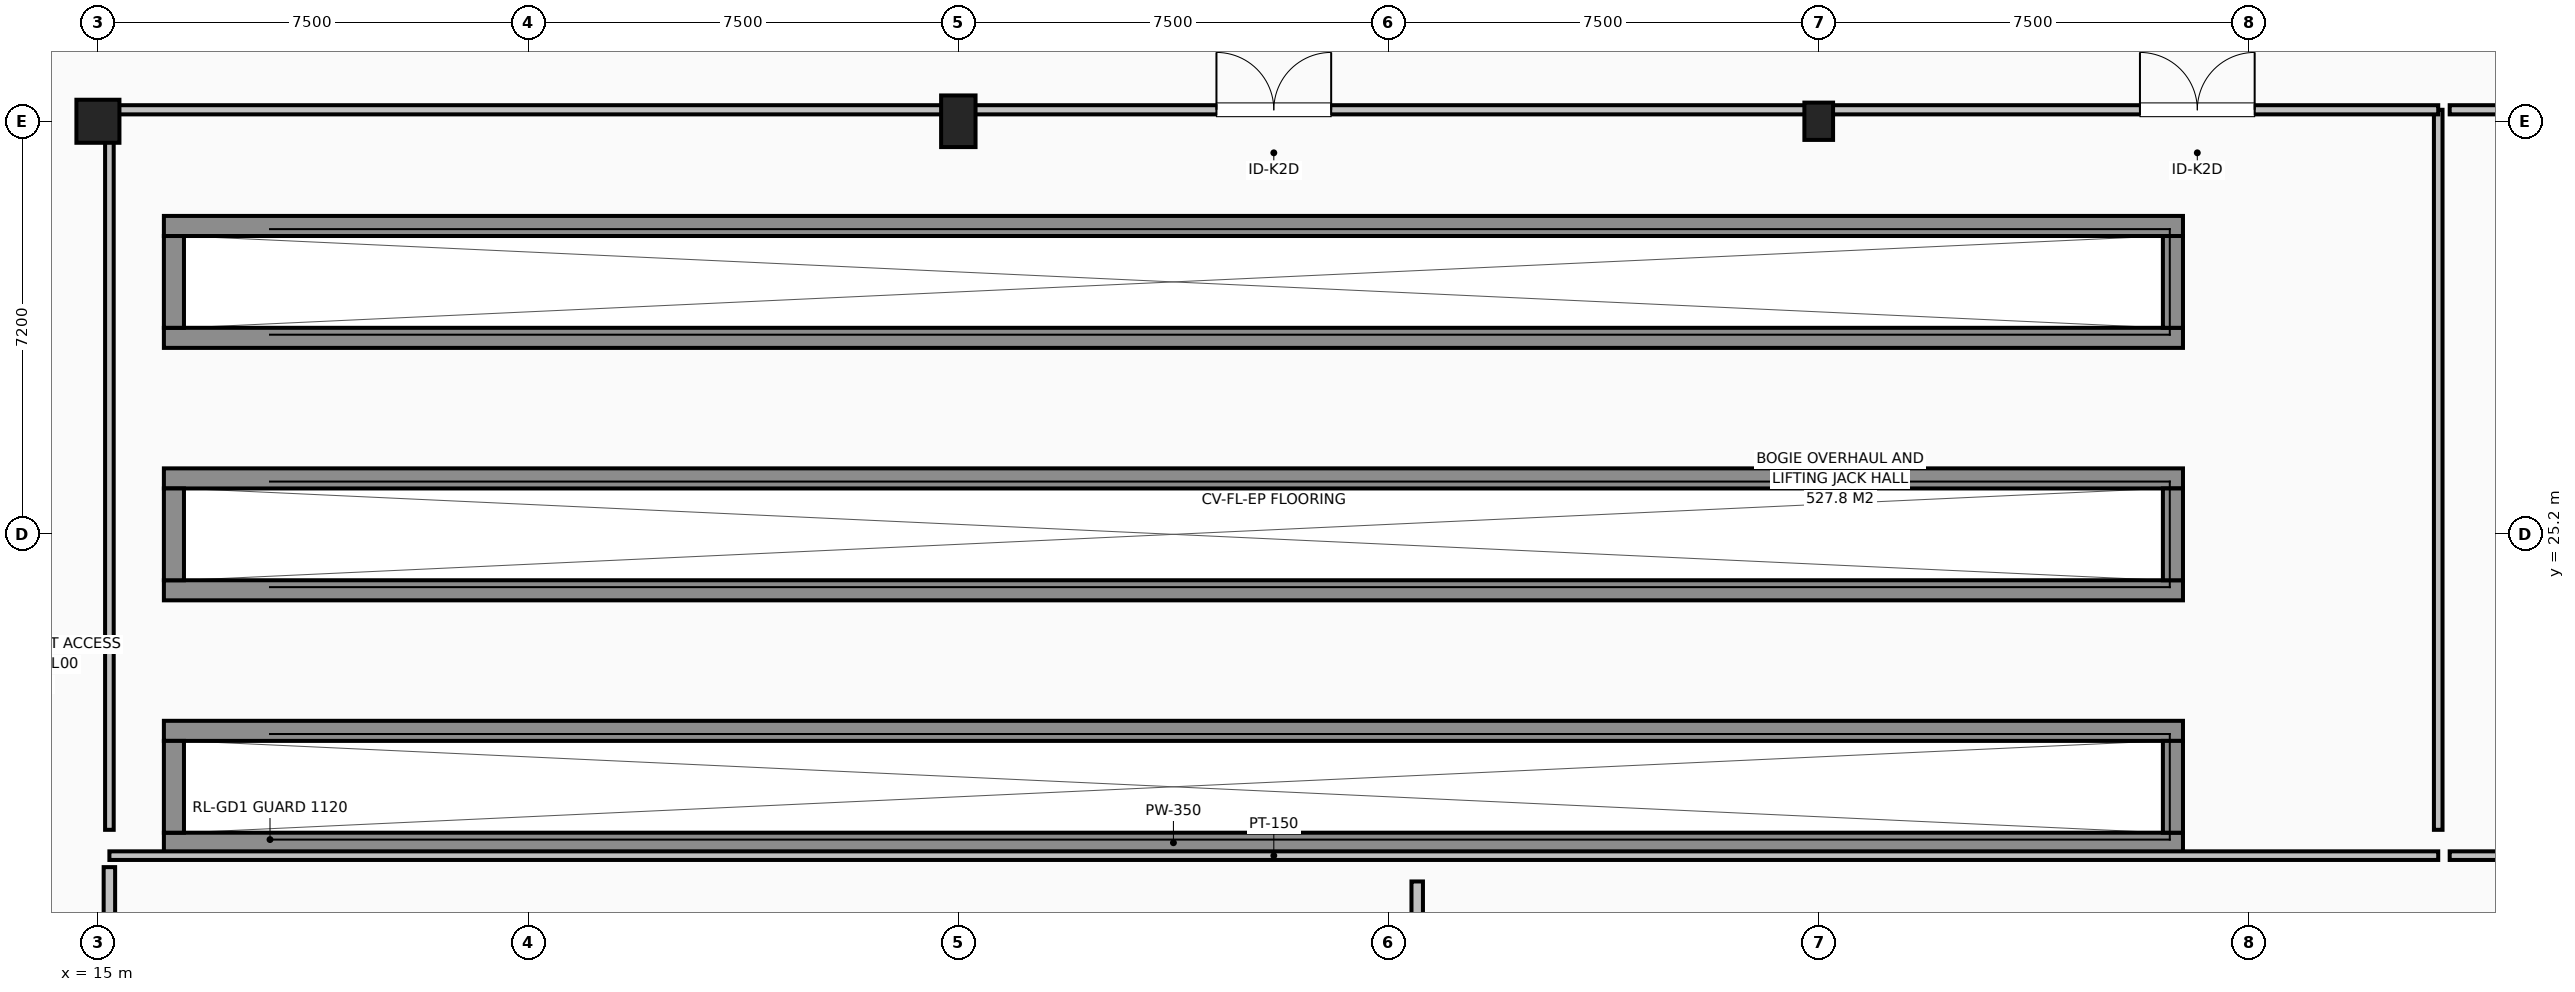
"""IFC4 building model, lengths in metres.
Left out: names, types, materials, properties, quantities, classifications, styles, units other than length and angle.
Written with IfcOpenShell. Run it as: python <this file> out.ifc"""

import sys

from ifc_helpers import new_model, si_unit, direction, frame, frame_2d, origin, origin_2d, place, context, subcontext, project, spatial, rectangle, extrude, element, fill, save


model = new_model("IFC4")
c1 = context("Model", 3, precision=1e-05, world=origin(), true_north=direction((0.0, 1.0)))
c2 = subcontext(c1, "Body", "Model", "MODEL_VIEW")
j1 = project(units=[si_unit("LENGTHUNIT", "METRE"), si_unit("PLANEANGLEUNIT", "RADIAN")], contexts=[c1])
p1 = place(None, origin())
s1 = spatial("IfcSite", under=j1, at=p1, CompositionType="ELEMENT")
p2 = place(p1, origin())
s2 = spatial("IfcBuilding", under=s1, at=p2, CompositionType="ELEMENT")
p3 = place(p2, origin())
s3 = spatial("IfcBuildingStorey", under=s2, at=p3, CompositionType="ELEMENT", Elevation=0.0)
for number, where, z_axis, x_axis in (
    (1, (16.15, 19.825, -1.65), (0.0, 0.0, 1.0), (1.0, 0.0, 0.0)),
    (2, (16.15, 21.775, -1.65), (0.0, 0.0, 1.0), (1.0, 0.0, 0.0)),
):
    element("IfcWall", number, at=place(p3, frame(where, z_axis=z_axis, x_axis=x_axis)), inside=s3, PredefinedType="USERDEFINED", context=c2, shape_type="SweptSolid", body=[
        extrude(rectangle(XDim=35.2, YDim=0.35, at=frame_2d((17.6, 0.0))), origin(), (0.0, 0.0, 1.0), 1.225),
    ])
for number, where, z_axis, x_axis in (
    (3, (16.325, 20.0, -1.65), (0.0, 0.0, 1.0), (0.0, 1.0, 0.0)),
    (4, (51.175, 20.0, -1.65), (0.0, 0.0, 1.0), (0.0, 1.0, 0.0)),
):
    element("IfcWall", number, at=place(p3, frame(where, z_axis=z_axis, x_axis=x_axis)), inside=s3, PredefinedType="USERDEFINED", context=c2, shape_type="SweptSolid", body=[
        extrude(rectangle(XDim=1.6, YDim=0.35, at=frame_2d((0.8, 0.0))), origin(), (0.0, 0.0, 1.0), 1.225),
    ])
for number, where, z_axis, x_axis in (
    (5, (16.15, 24.225, -1.65), (0.0, 0.0, 1.0), (1.0, 0.0, 0.0)),
    (6, (16.15, 26.175, -1.65), (0.0, 0.0, 1.0), (1.0, 0.0, 0.0)),
):
    element("IfcWall", number, at=place(p3, frame(where, z_axis=z_axis, x_axis=x_axis)), inside=s3, PredefinedType="USERDEFINED", context=c2, shape_type="SweptSolid", body=[
        extrude(rectangle(XDim=35.2, YDim=0.35, at=frame_2d((17.6, 0.0))), origin(), (0.0, 0.0, 1.0), 1.225),
    ])
for number, where, z_axis, x_axis in (
    (7, (16.325, 24.4, -1.65), (0.0, 0.0, 1.0), (0.0, 1.0, 0.0)),
    (8, (51.175, 24.4, -1.65), (0.0, 0.0, 1.0), (0.0, 1.0, 0.0)),
):
    element("IfcWall", number, at=place(p3, frame(where, z_axis=z_axis, x_axis=x_axis)), inside=s3, PredefinedType="USERDEFINED", context=c2, shape_type="SweptSolid", body=[
        extrude(rectangle(XDim=1.6, YDim=0.35, at=frame_2d((0.8, 0.0))), origin(), (0.0, 0.0, 1.0), 1.225),
    ])
for number, where, z_axis, x_axis in (
    (9, (16.15, 28.625, -1.65), (0.0, 0.0, 1.0), (1.0, 0.0, 0.0)),
    (10, (16.15, 30.575, -1.65), (0.0, 0.0, 1.0), (1.0, 0.0, 0.0)),
):
    element("IfcWall", number, at=place(p3, frame(where, z_axis=z_axis, x_axis=x_axis)), inside=s3, PredefinedType="USERDEFINED", context=c2, shape_type="SweptSolid", body=[
        extrude(rectangle(XDim=35.2, YDim=0.35, at=frame_2d((17.6, 0.0))), origin(), (0.0, 0.0, 1.0), 1.225),
    ])
for number, where, z_axis, x_axis in (
    (11, (16.325, 28.8, -1.65), (0.0, 0.0, 1.0), (0.0, 1.0, 0.0)),
    (12, (51.175, 28.8, -1.65), (0.0, 0.0, 1.0), (0.0, 1.0, 0.0)),
):
    element("IfcWall", number, at=place(p3, frame(where, z_axis=z_axis, x_axis=x_axis)), inside=s3, PredefinedType="USERDEFINED", context=c2, shape_type="SweptSolid", body=[
        extrude(rectangle(XDim=1.6, YDim=0.35, at=frame_2d((0.8, 0.0))), origin(), (0.0, 0.0, 1.0), 1.225),
    ])
p4 = place(p3, frame((15.0, 32.4, 0.0), z_axis=(0.0, 0.0, 1.0), x_axis=(1.0, 0.0, 0.0)))
e13 = element("IfcColumn", 13, at=p4, inside=s3, PredefinedType="COLUMN", context=c2, shape_type="SweptSolid", body=[
    extrude(rectangle(XDim=0.75, YDim=0.75, at=origin_2d()), origin(), (0.0, 0.0, 1.0), 4.8),
])
p5 = place(p3, frame((30.0, 32.4, 0.0), z_axis=(0.0, 0.0, 1.0), x_axis=(1.0, 0.0, 0.0)))
e14 = element("IfcColumn", 14, at=p5, inside=s3, PredefinedType="COLUMN", context=c2, shape_type="SweptSolid", body=[
    extrude(rectangle(XDim=0.6, YDim=0.9, at=origin_2d()), origin(), (0.0, 0.0, 1.0), 4.8),
])
p6 = place(p3, frame((45.0, 32.4, 0.0), z_axis=(0.0, 0.0, 1.0), x_axis=(1.0, 0.0, 0.0)))
e15 = element("IfcColumn", 15, at=p6, inside=s3, PredefinedType="COLUMN", context=c2, shape_type="SweptSolid", body=[
    extrude(rectangle(XDim=0.5, YDim=0.65, at=origin_2d()), origin(), (0.0, 0.0, 1.0), 4.8),
])
p7 = place(p3, frame((55.8, 19.6, 0.0), z_axis=(0.0, 0.0, 1.0), x_axis=(-1.0, 0.0, 0.0)))
e16 = element("IfcWall", 16, at=p7, inside=s3, PredefinedType="PARTITIONING", context=c2, shape_type="SweptSolid", body=[
    extrude(rectangle(XDim=40.6, YDim=0.15, at=frame_2d((20.3, 0.0))), origin(), (0.0, 0.0, 1.0), 3.682),
])
p8 = place(p3, frame((55.8, 20.05, 0.0), z_axis=(0.0, 0.0, 1.0), x_axis=(0.0, 1.0, 0.0)))
e17 = element("IfcWall", 17, at=p8, inside=s3, PredefinedType="PARTITIONING", context=c2, shape_type="SweptSolid", body=[
    extrude(rectangle(XDim=12.55, YDim=0.15, at=frame_2d((6.275, 0.0))), origin(), (0.0, 0.0, 1.0), 3.87),
])
p9 = place(p3, frame((15.2, 32.6, 0.0), z_axis=(0.0, 0.0, 1.0), x_axis=(0.0, -1.0, 0.0)))
e18 = element("IfcWall", 18, at=p9, inside=s3, PredefinedType="PARTITIONING", context=c2, shape_type="SweptSolid", body=[
    extrude(rectangle(XDim=12.55, YDim=0.15, at=frame_2d((6.275, 0.0))), origin(), (0.0, 0.0, 1.0), 4.1),
])
p10 = place(p3, frame((15.2, 32.6, 0.0), z_axis=(0.0, 0.0, 1.0), x_axis=(1.0, 0.0, 0.0)))
e19 = element("IfcWall", 19, at=p10, inside=s3, PredefinedType="PARTITIONING", context=c2, shape_type="SweptSolid", body=[
    extrude(rectangle(XDim=40.6, YDim=0.16, at=frame_2d((20.3, 0.0))), origin(), (0.0, 0.0, 1.0), 3.87),
])
p11 = place(p10, frame((19.3, 0.0, 0.0)))
e20 = element("IfcOpeningElement", 20, at=p11, cuts=e19, PredefinedType="OPENING", context=c2, shape_type="SweptSolid", body=[
    extrude(rectangle(XDim=2.0, YDim=2.3, at=frame_2d((1.0, 1.15))), frame((0.0, 0.09, 0.0), z_axis=(0.0, -1.0, 0.0), x_axis=(1.0, 0.0, 0.0)), (0.0, 0.0, 1.0), 0.18),
])
p12 = place(p10, frame((35.4, 0.0, 0.0)))
e21 = element("IfcOpeningElement", 21, at=p12, cuts=e19, PredefinedType="OPENING", context=c2, shape_type="SweptSolid", body=[
    extrude(rectangle(XDim=2.0, YDim=2.3, at=frame_2d((1.0, 1.15))), frame((0.0, 0.09, 0.0), z_axis=(0.0, -1.0, 0.0), x_axis=(1.0, 0.0, 0.0)), (0.0, 0.0, 1.0), 0.18),
])
p13 = place(p3, frame((92.4, 19.6, 0.0), z_axis=(0.0, 0.0, 1.0), x_axis=(-1.0, 0.0, 0.0)))
e22 = element("IfcWall", 22, at=p13, inside=s3, PredefinedType="PARTITIONING", context=c2, shape_type="SweptSolid", body=[
    extrude(rectangle(XDim=36.4, YDim=0.15, at=frame_2d((18.2, 0.0))), origin(), (0.0, 0.0, 1.0), 3.682),
])
p14 = place(p3, frame((56.0, 32.6, 0.0), z_axis=(0.0, 0.0, 1.0), x_axis=(1.0, 0.0, 0.0)))
e23 = element("IfcWall", 23, at=p14, inside=s3, PredefinedType="PARTITIONING", context=c2, shape_type="SweptSolid", body=[
    extrude(rectangle(XDim=36.4, YDim=0.16, at=frame_2d((18.2, 0.0))), origin(), (0.0, 0.0, 1.0), 3.782),
])
p15 = place(p14, frame((10.32, 0.0, 0.0)))
e24 = element("IfcOpeningElement", 24, at=p15, cuts=e23, PredefinedType="OPENING", context=c2, shape_type="SweptSolid", body=[
    extrude(rectangle(XDim=2.0, YDim=2.3, at=frame_2d((1.0, 1.15))), frame((0.0, 0.09, 0.0), z_axis=(0.0, -1.0, 0.0), x_axis=(1.0, 0.0, 0.0)), (0.0, 0.0, 1.0), 0.18),
])
p16 = place(p14, frame((31.2, 0.0, 0.0)))
e25 = element("IfcOpeningElement", 25, at=p16, cuts=e23, PredefinedType="OPENING", context=c2, shape_type="SweptSolid", body=[
    extrude(rectangle(XDim=2.0, YDim=2.3, at=frame_2d((1.0, 1.15))), frame((0.0, 0.09, 0.0), z_axis=(0.0, -1.0, 0.0), x_axis=(1.0, 0.0, 0.0)), (0.0, 0.0, 1.0), 0.18),
])
p17 = place(p3, frame((38.0, 11.85, 0.0), z_axis=(0.0, 0.0, 1.0), x_axis=(0.0, 1.0, 0.0)))
e26 = element("IfcWall", 26, at=p17, inside=s3, PredefinedType="SOLIDWALL", context=c2, shape_type="SweptSolid", body=[
    extrude(rectangle(XDim=7.3, YDim=0.2, at=frame_2d((3.65, 0.0))), origin(), (0.0, 0.0, 1.0), 4.1),
])
p18 = place(p3, frame((15.2, 19.4, 0.0), z_axis=(0.0, 0.0, 1.0), x_axis=(0.0, -1.0, 0.0)))
e27 = element("IfcWall", 27, at=p18, inside=s3, PredefinedType="SOLIDWALL", context=c2, shape_type="SweptSolid", body=[
    extrude(rectangle(XDim=4.55, YDim=0.2, at=frame_2d((2.275, 0.0))), origin(), (0.0, 0.0, 1.0), 4.1),
])
p19 = place(p18, frame((1.375, 0.0, 0.0)))
e28 = element("IfcOpeningElement", 28, at=p19, cuts=e27, PredefinedType="OPENING", context=c2, shape_type="SweptSolid", body=[
    extrude(rectangle(XDim=1.8, YDim=2.2, at=frame_2d((0.9, 1.1))), frame((0.0, 0.11, 0.0), z_axis=(0.0, -1.0, 0.0), x_axis=(1.0, 0.0, 0.0)), (0.0, 0.0, 1.0), 0.22),
])
p20 = place(p11, origin())
e29 = element("IfcDoor", 29, at=p20, inside=s3, OperationType="DOUBLE_SWING_LEFT", PredefinedType="DOOR", context=c2, shape_type="SweptSolid", body=[
    extrude(rectangle(XDim=2.0, YDim=2.3, at=frame_2d((1.0, 1.15))), frame((0.0, 0.025, 0.0), z_axis=(0.0, -1.0, 0.0), x_axis=(1.0, 0.0, 0.0)), (0.0, 0.0, 1.0), 0.05),
])
fill(e20, e29)
p21 = place(p12, origin())
e30 = element("IfcDoor", 30, at=p21, inside=s3, OperationType="DOUBLE_SWING_LEFT", PredefinedType="DOOR", context=c2, shape_type="SweptSolid", body=[
    extrude(rectangle(XDim=2.0, YDim=2.3, at=frame_2d((1.0, 1.15))), frame((0.0, 0.025, 0.0), z_axis=(0.0, -1.0, 0.0), x_axis=(1.0, 0.0, 0.0)), (0.0, 0.0, 1.0), 0.05),
])
fill(e21, e30)
save(model, sys.argv[1])
